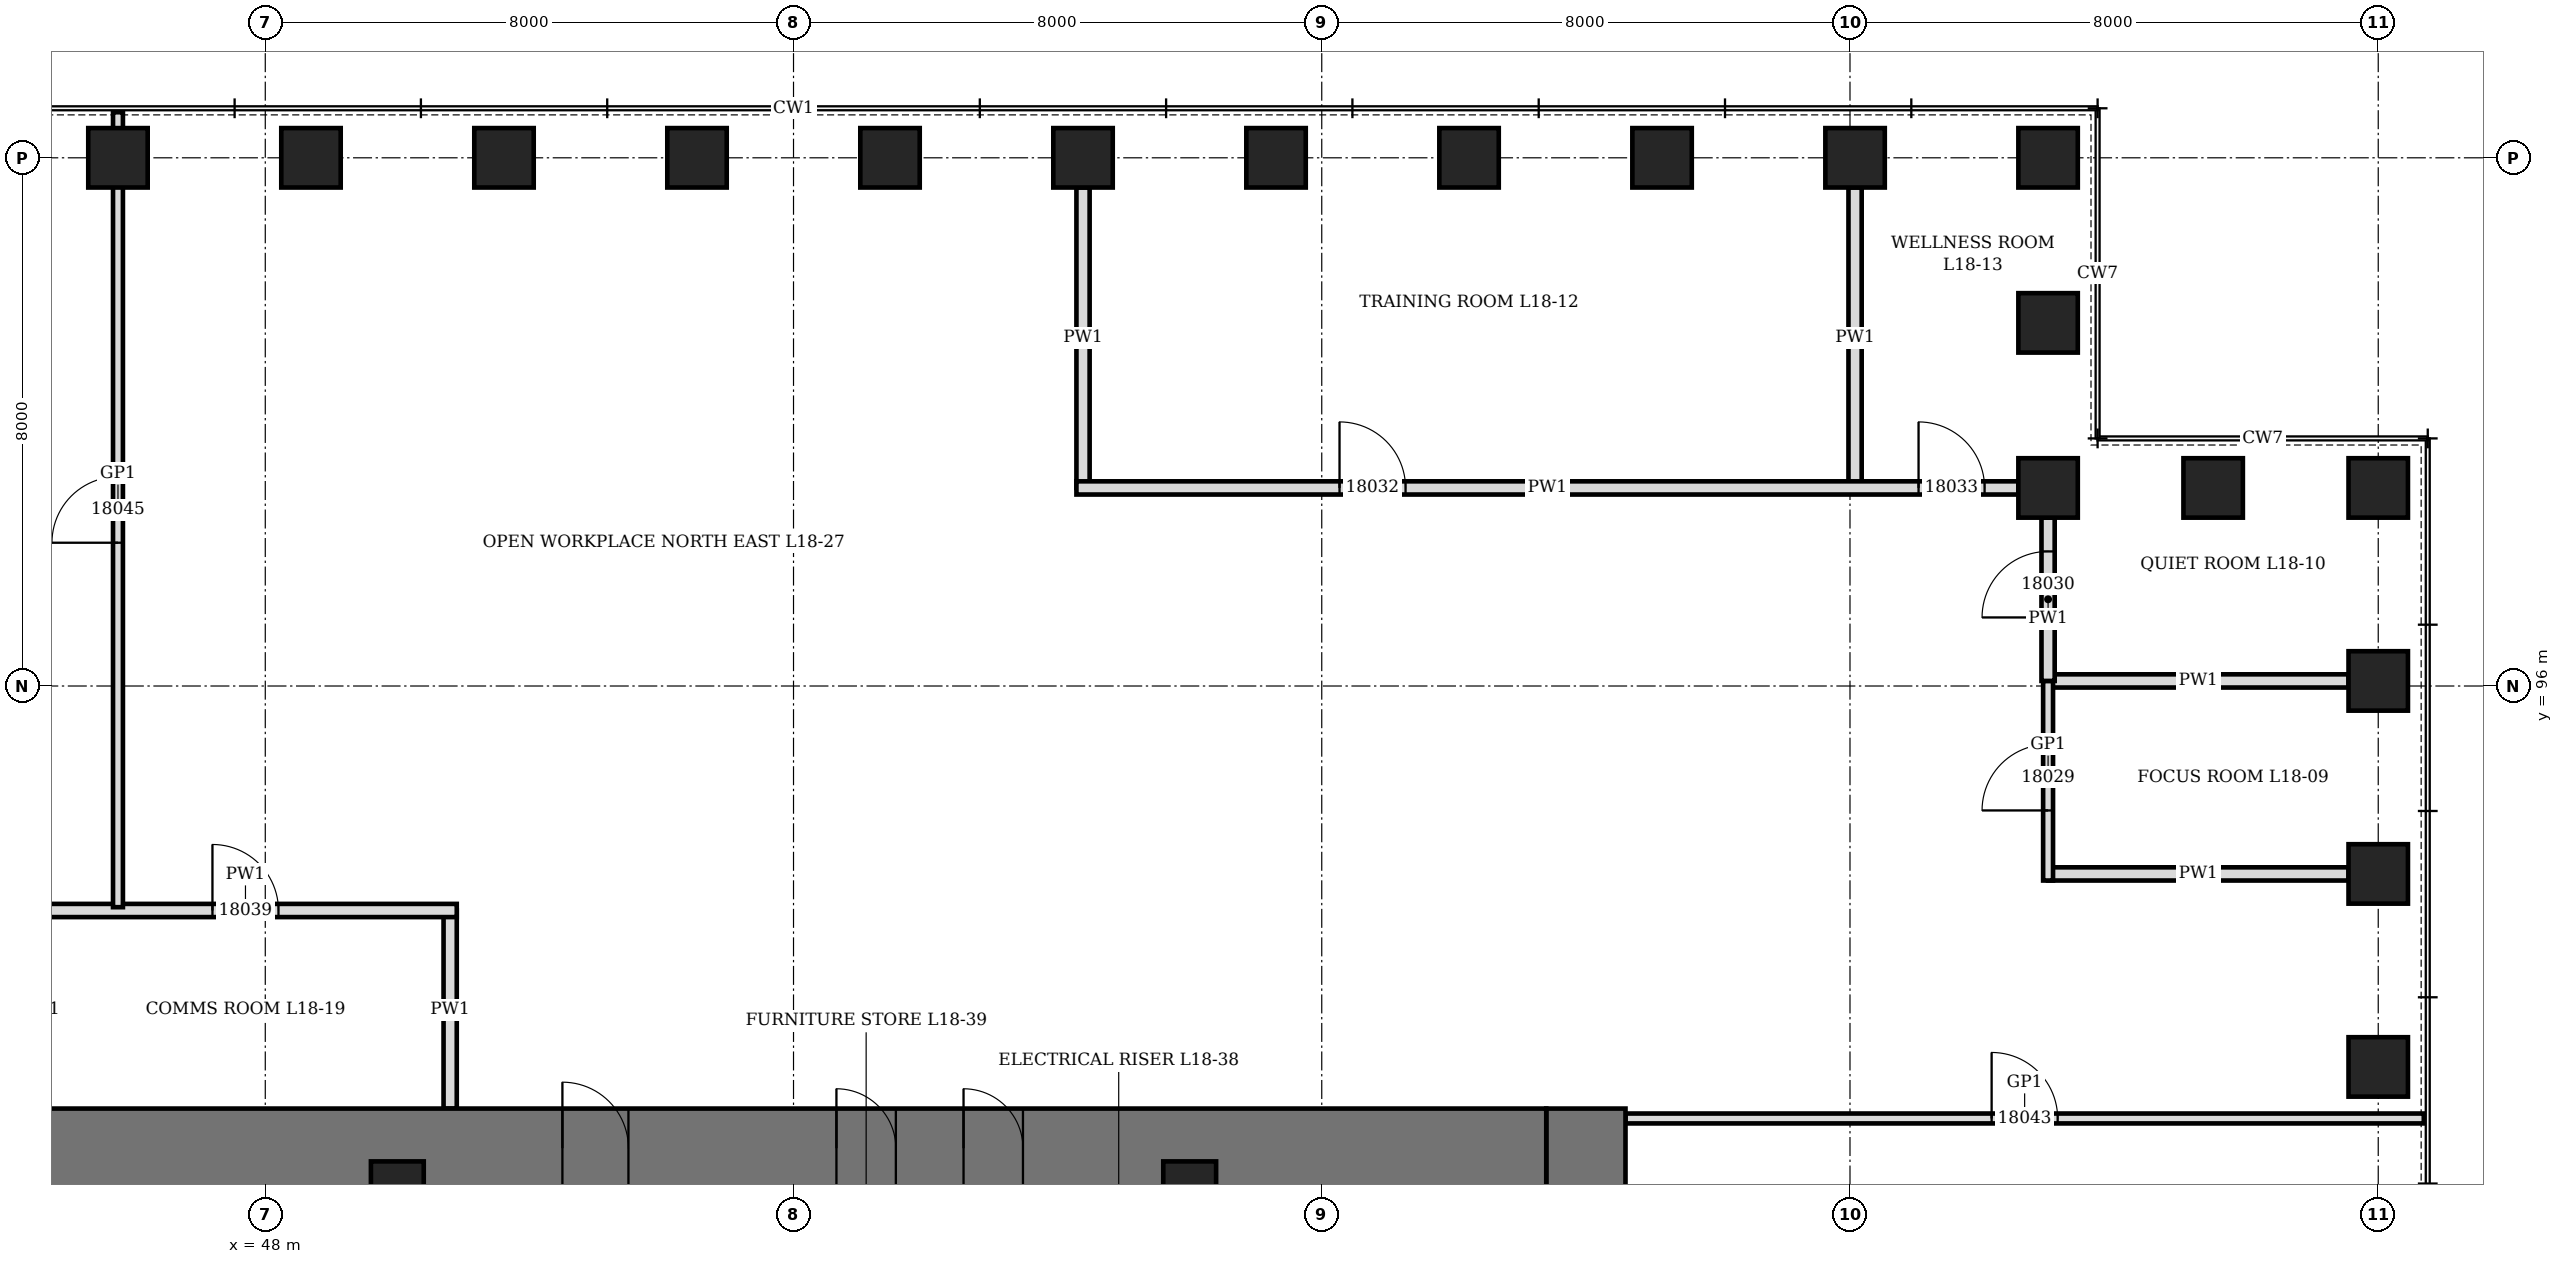
"""IFC4 building model, lengths in metres.
Left out: names, types, materials, properties, quantities, classifications, styles, units other than length and angle.
Written with IfcOpenShell. Run it as: python <this file> out.ifc"""

import sys

from ifc_helpers import new_model, si_unit, direction, frame, frame_2d, origin, origin_2d, place, context, subcontext, project, spatial, rectangle, hollow_rectangle, extrude, element, fill, save


model = new_model("IFC4")
c1 = context("Model", 3, precision=1e-05, world=origin(), true_north=direction((0.0, 1.0)))
c2 = subcontext(c1, "Body", "Model", "MODEL_VIEW")
j1 = project(units=[si_unit("LENGTHUNIT", "METRE"), si_unit("PLANEANGLEUNIT", "RADIAN")], contexts=[c1])
p1 = place(None, origin())
s1 = spatial("IfcSite", under=j1, at=p1, CompositionType="ELEMENT")
p2 = place(p1, origin())
s2 = spatial("IfcBuilding", under=s1, at=p2, CompositionType="ELEMENT")
p3 = place(p2, frame((0.0, 0.0, 85.3)))
s3 = spatial("IfcBuildingStorey", under=s2, at=p3, CompositionType="ELEMENT", Elevation=85.3)
for number, where, z_axis, x_axis in (
    (1, (80.0, 90.231, 0.0), (0.0, 0.0, 1.0), (0.0, 1.0, 0.0)),
    (2, (80.0, 93.154, 0.0), (0.0, 0.0, 1.0), (0.0, 1.0, 0.0)),
    (3, (80.0, 96.077, 0.0), (0.0, 0.0, 1.0), (0.0, 1.0, 0.0)),
    (4, (80.0, 99.0, 0.0), (0.0, 0.0, 1.0), (1.0, 0.0, 0.0)),
    (5, (77.5, 99.0, 0.0), (0.0, 0.0, 1.0), (1.0, 0.0, 0.0)),
    (6, (75.0, 99.0, 0.0), (0.0, 0.0, 1.0), (0.0, 1.0, 0.0)),
    (7, (75.0, 101.5, 0.0), (0.0, 0.0, 1.0), (0.0, 1.0, 0.0)),
    (8, (75.0, 104.0, 0.0), (0.0, 0.0, 1.0), (1.0, 0.0, 0.0)),
    (9, (72.077, 104.0, 0.0), (0.0, 0.0, 1.0), (1.0, 0.0, 0.0)),
    (10, (69.154, 104.0, 0.0), (0.0, 0.0, 1.0), (1.0, 0.0, 0.0)),
    (11, (66.231, 104.0, 0.0), (0.0, 0.0, 1.0), (1.0, 0.0, 0.0)),
    (12, (63.308, 104.0, 0.0), (0.0, 0.0, 1.0), (1.0, 0.0, 0.0)),
    (13, (60.385, 104.0, 0.0), (0.0, 0.0, 1.0), (1.0, 0.0, 0.0)),
    (14, (57.461, 104.0, 0.0), (0.0, 0.0, 1.0), (1.0, 0.0, 0.0)),
    (15, (54.539, 104.0, 0.0), (0.0, 0.0, 1.0), (1.0, 0.0, 0.0)),
    (16, (51.615, 104.0, 0.0), (0.0, 0.0, 1.0), (1.0, 0.0, 0.0)),
    (17, (48.692, 104.0, 0.0), (0.0, 0.0, 1.0), (1.0, 0.0, 0.0)),
    (18, (45.769, 104.0, 0.0), (0.0, 0.0, 1.0), (1.0, 0.0, 0.0)),
):
    element("IfcColumn", number, at=place(p3, frame(where, z_axis=z_axis, x_axis=x_axis)), inside=s3, PredefinedType="COLUMN", context=c2, shape_type="SweptSolid", body=[
        extrude(hollow_rectangle(XDim=0.9, YDim=0.9, WallThickness=0.12, at=origin_2d()), origin(), (0.0, 0.0, 1.0), 4.2),
    ])
p4 = place(p3, frame((68.0, 70.4, 0.0), z_axis=(0.0, 0.0, 1.0), x_axis=(0.0, 1.0, 0.0)))
e19 = element("IfcWall", 19, at=p4, inside=s3, PredefinedType="SHEAR", context=c2, shape_type="SweptSolid", body=[
    extrude(rectangle(XDim=19.2, YDim=1.2, at=frame_2d((9.6, 0.0))), origin(), (0.0, 0.0, 1.0), 4.2),
])
p5 = place(p4, frame((8.6, 0.0, 0.0)))
e20 = element("IfcOpeningElement", 20, at=p5, cuts=e19, PredefinedType="OPENING", context=c2, shape_type="SweptSolid", body=[
    extrude(rectangle(XDim=2.0, YDim=2.4, at=frame_2d((1.0, 1.2))), frame((0.0, 0.61, 0.0), z_axis=(0.0, -1.0, 0.0), x_axis=(1.0, 0.0, 0.0)), (0.0, 0.0, 1.0), 1.22),
])
p6 = place(p3, frame((44.6, 89.0, 0.0), z_axis=(0.0, 0.0, 1.0), x_axis=(1.0, 0.0, 0.0)))
e21 = element("IfcWall", 21, at=p6, inside=s3, PredefinedType="SHEAR", context=c2, shape_type="SweptSolid", body=[
    extrude(rectangle(XDim=22.8, YDim=1.2, at=frame_2d((11.4, 0.0))), origin(), (0.0, 0.0, 1.0), 4.2),
])
p7 = place(p6, frame((7.9, 0.0, 0.0)))
e22 = element("IfcOpeningElement", 22, at=p7, cuts=e21, PredefinedType="OPENING", context=c2, shape_type="SweptSolid", body=[
    extrude(rectangle(XDim=1.0, YDim=2.1, at=frame_2d((0.5, 1.05))), frame((0.0, 0.61, 0.0), z_axis=(0.0, -1.0, 0.0), x_axis=(1.0, 0.0, 0.0)), (0.0, 0.0, 1.0), 1.22),
])
p8 = place(p6, frame((12.05, 0.0, 0.0)))
e23 = element("IfcOpeningElement", 23, at=p8, cuts=e21, PredefinedType="OPENING", context=c2, shape_type="SweptSolid", body=[
    extrude(rectangle(XDim=0.9, YDim=2.1, at=frame_2d((0.45, 1.05))), frame((0.0, 0.61, 0.0), z_axis=(0.0, -1.0, 0.0), x_axis=(1.0, 0.0, 0.0)), (0.0, 0.0, 1.0), 1.22),
])
p9 = place(p6, frame((13.975, 0.0, 0.0)))
e24 = element("IfcOpeningElement", 24, at=p9, cuts=e21, PredefinedType="OPENING", context=c2, shape_type="SweptSolid", body=[
    extrude(rectangle(XDim=0.9, YDim=2.1, at=frame_2d((0.45, 1.05))), frame((0.0, 0.61, 0.0), z_axis=(0.0, -1.0, 0.0), x_axis=(1.0, 0.0, 0.0)), (0.0, 0.0, 1.0), 1.22),
])
for number, where, z_axis, x_axis in (
    (25, (50.0, 88.4, 0.0), (0.0, 0.0, 1.0), (1.0, 0.0, 0.0)),
    (26, (62.0, 88.4, 0.0), (0.0, 0.0, 1.0), (1.0, 0.0, 0.0)),
):
    element("IfcColumn", number, at=place(p3, frame(where, z_axis=z_axis, x_axis=x_axis)), inside=s3, PredefinedType="COLUMN", context=c2, shape_type="SweptSolid", body=[
        extrude(hollow_rectangle(XDim=0.8, YDim=0.8, WallThickness=0.1, at=origin_2d()), origin(), (0.0, 0.0, 1.0), 4.2),
    ])
for number, where, z_axis, x_axis in (
    (27, (75.0, 93.154, 0.0), (0.0, 0.0, 1.0), (1.0, 0.0, 0.0)),
    (28, (75.0, 96.077, 0.0), (0.0, 0.0, 1.0), (1.0, 0.0, 0.0)),
):
    element("IfcWall", number, at=place(p3, frame(where, z_axis=z_axis, x_axis=x_axis)), inside=s3, PredefinedType="PARTITIONING", context=c2, shape_type="SweptSolid", body=[
        extrude(rectangle(XDim=4.55, YDim=0.2, at=frame_2d((2.275, 0.0))), origin(), (0.0, 0.0, 1.0), 3.428),
    ])
p10 = place(p3, frame((60.385, 99.0, 0.0), z_axis=(0.0, 0.0, 1.0), x_axis=(0.0, 1.0, 0.0)))
e29 = element("IfcWall", 29, at=p10, inside=s3, PredefinedType="PARTITIONING", context=c2, shape_type="SweptSolid", body=[
    extrude(rectangle(XDim=4.55, YDim=0.2, at=frame_2d((2.275, 0.0))), origin(), (0.0, 0.0, 1.0), 3.278),
])
p11 = place(p3, frame((72.077, 99.0, 0.0), z_axis=(0.0, 0.0, 1.0), x_axis=(0.0, 1.0, 0.0)))
e30 = element("IfcWall", 30, at=p11, inside=s3, PredefinedType="PARTITIONING", context=c2, shape_type="SweptSolid", body=[
    extrude(rectangle(XDim=4.55, YDim=0.2, at=frame_2d((2.275, 0.0))), origin(), (0.0, 0.0, 1.0), 3.428),
])
p12 = place(p3, frame((50.8, 89.6, 0.0), z_axis=(0.0, 0.0, 1.0), x_axis=(0.0, 1.0, 0.0)))
e31 = element("IfcWall", 31, at=p12, inside=s3, PredefinedType="PARTITIONING", context=c2, shape_type="SweptSolid", body=[
    extrude(rectangle(XDim=3.0, YDim=0.2, at=frame_2d((1.5, 0.0))), origin(), (0.0, 0.0, 1.0), 4.04),
])
p13 = place(p3, frame((68.6, 89.45, 0.0), z_axis=(0.0, 0.0, 1.0), x_axis=(1.0, 0.0, 0.0)))
e32 = element("IfcWall", 32, at=p13, inside=s3, PredefinedType="PARTITIONING", context=c2, shape_type="SweptSolid", body=[
    extrude(rectangle(XDim=12.09, YDim=0.15, at=frame_2d((6.045, 0.0))), origin(), (0.0, 0.0, 1.0), 4.04),
])
p14 = place(p13, frame((5.545, 0.0, 0.0)))
e33 = element("IfcOpeningElement", 33, at=p14, cuts=e32, PredefinedType="OPENING", context=c2, shape_type="SweptSolid", body=[
    extrude(rectangle(XDim=1.0, YDim=2.4, at=frame_2d((0.5, 1.2))), frame((0.0, 0.085, 0.0), z_axis=(0.0, -1.0, 0.0), x_axis=(1.0, 0.0, 0.0)), (0.0, 0.0, 1.0), 0.17),
])
p15 = place(p3, frame((44.5, 92.6, 0.0), z_axis=(0.0, 0.0, 1.0), x_axis=(1.0, 0.0, 0.0)))
e34 = element("IfcWall", 34, at=p15, inside=s3, PredefinedType="PARTITIONING", context=c2, shape_type="SweptSolid", body=[
    extrude(rectangle(XDim=6.4, YDim=0.2, at=frame_2d((3.2, 0.0))), origin(), (0.0, 0.0, 1.0), 4.04),
])
p16 = place(p15, frame((2.7, 0.0, 0.0)))
e35 = element("IfcOpeningElement", 35, at=p16, cuts=e34, PredefinedType="OPENING", context=c2, shape_type="SweptSolid", body=[
    extrude(rectangle(XDim=1.0, YDim=2.1, at=frame_2d((0.5, 1.05))), frame((0.0, 0.11, 0.0), z_axis=(0.0, -1.0, 0.0), x_axis=(1.0, 0.0, 0.0)), (0.0, 0.0, 1.0), 0.22),
])
p17 = place(p3, frame((60.285, 99.0, 0.0), z_axis=(0.0, 0.0, 1.0), x_axis=(1.0, 0.0, 0.0)))
e36 = element("IfcWall", 36, at=p17, inside=s3, PredefinedType="PARTITIONING", context=c2, shape_type="SweptSolid", body=[
    extrude(rectangle(XDim=14.265, YDim=0.2, at=frame_2d((7.133, 0.0))), origin(), (0.0, 0.0, 1.0), 4.04),
])
p18 = place(p17, frame((3.985, 0.0, 0.0)))
e37 = element("IfcOpeningElement", 37, at=p18, cuts=e36, PredefinedType="OPENING", context=c2, shape_type="SweptSolid", body=[
    extrude(rectangle(XDim=1.0, YDim=2.1, at=frame_2d((0.5, 1.05))), frame((0.0, 0.11, 0.0), z_axis=(0.0, -1.0, 0.0), x_axis=(1.0, 0.0, 0.0)), (0.0, 0.0, 1.0), 0.22),
])
p19 = place(p17, frame((12.754, 0.0, 0.0)))
e38 = element("IfcOpeningElement", 38, at=p19, cuts=e36, PredefinedType="OPENING", context=c2, shape_type="SweptSolid", body=[
    extrude(rectangle(XDim=1.0, YDim=2.1, at=frame_2d((0.5, 1.05))), frame((0.0, 0.11, 0.0), z_axis=(0.0, -1.0, 0.0), x_axis=(1.0, 0.0, 0.0)), (0.0, 0.0, 1.0), 0.22),
])
p20 = place(p3, frame((45.769, 92.65, 0.0), z_axis=(0.0, 0.0, 1.0), x_axis=(0.0, 1.0, 0.0)))
e39 = element("IfcWall", 39, at=p20, inside=s3, PredefinedType="PARTITIONING", context=c2, shape_type="SweptSolid", body=[
    extrude(rectangle(XDim=12.04, YDim=0.15, at=frame_2d((6.02, 0.0))), origin(), (0.0, 0.0, 1.0), 3.278),
])
p21 = place(p20, frame((5.52, 0.0, 0.0)))
e40 = element("IfcOpeningElement", 40, at=p21, cuts=e39, PredefinedType="OPENING", context=c2, shape_type="SweptSolid", body=[
    extrude(rectangle(XDim=1.0, YDim=2.4, at=frame_2d((0.5, 1.2))), frame((0.0, 0.085, 0.0), z_axis=(0.0, -1.0, 0.0), x_axis=(1.0, 0.0, 0.0)), (0.0, 0.0, 1.0), 0.17),
])
p22 = place(p3, frame((75.0, 93.054, 0.0), z_axis=(0.0, 0.0, 1.0), x_axis=(0.0, 1.0, 0.0)))
e41 = element("IfcWall", 41, at=p22, inside=s3, PredefinedType="PARTITIONING", context=c2, shape_type="SweptSolid", body=[
    extrude(rectangle(XDim=3.023, YDim=0.15, at=frame_2d((1.511, 0.0))), origin(), (0.0, 0.0, 1.0), 4.04),
])
p23 = place(p22, frame((1.062, 0.0, 0.0)))
e42 = element("IfcOpeningElement", 42, at=p23, cuts=e41, PredefinedType="OPENING", context=c2, shape_type="SweptSolid", body=[
    extrude(rectangle(XDim=1.0, YDim=2.4, at=frame_2d((0.5, 1.2))), frame((0.0, 0.085, 0.0), z_axis=(0.0, -1.0, 0.0), x_axis=(1.0, 0.0, 0.0)), (0.0, 0.0, 1.0), 0.17),
])
p24 = place(p3, frame((75.0, 96.077, 0.0), z_axis=(0.0, 0.0, 1.0), x_axis=(0.0, 1.0, 0.0)))
e43 = element("IfcWall", 43, at=p24, inside=s3, PredefinedType="PARTITIONING", context=c2, shape_type="SweptSolid", body=[
    extrude(rectangle(XDim=2.473, YDim=0.2, at=frame_2d((1.237, 0.0))), origin(), (0.0, 0.0, 1.0), 4.04),
])
p25 = place(p24, frame((0.961, 0.0, 0.0)))
e44 = element("IfcOpeningElement", 44, at=p25, cuts=e43, PredefinedType="OPENING", context=c2, shape_type="SweptSolid", body=[
    extrude(rectangle(XDim=1.0, YDim=2.1, at=frame_2d((0.5, 1.05))), frame((0.0, 0.11, 0.0), z_axis=(0.0, -1.0, 0.0), x_axis=(1.0, 0.0, 0.0)), (0.0, 0.0, 1.0), 0.22),
])
p26 = place(p7, origin())
e45 = element("IfcDoor", 45, at=p26, inside=s3, OperationType="SINGLE_SWING_LEFT", PredefinedType="DOOR", context=c2, shape_type="SweptSolid", body=[
    extrude(rectangle(XDim=1.0, YDim=2.1, at=frame_2d((0.5, 1.05))), frame((0.0, 0.35, 0.0), z_axis=(0.0, -1.0, 0.0), x_axis=(1.0, 0.0, 0.0)), (0.0, 0.0, 1.0), 0.7),
])
fill(e22, e45)
p27 = place(p8, origin())
e46 = element("IfcDoor", 46, at=p27, inside=s3, OperationType="SINGLE_SWING_LEFT", PredefinedType="DOOR", context=c2, shape_type="SweptSolid", body=[
    extrude(rectangle(XDim=0.9, YDim=2.1, at=frame_2d((0.45, 1.05))), frame((0.0, 0.35, 0.0), z_axis=(0.0, -1.0, 0.0), x_axis=(1.0, 0.0, 0.0)), (0.0, 0.0, 1.0), 0.7),
])
fill(e23, e46)
p28 = place(p9, origin())
e47 = element("IfcDoor", 47, at=p28, inside=s3, OperationType="SINGLE_SWING_LEFT", PredefinedType="DOOR", context=c2, shape_type="SweptSolid", body=[
    extrude(rectangle(XDim=0.9, YDim=2.1, at=frame_2d((0.45, 1.05))), frame((0.0, 0.35, 0.0), z_axis=(0.0, -1.0, 0.0), x_axis=(1.0, 0.0, 0.0)), (0.0, 0.0, 1.0), 0.7),
])
fill(e24, e47)
p29 = place(p23, origin())
e48 = element("IfcDoor", 48, at=p29, inside=s3, OperationType="SINGLE_SWING_RIGHT", PredefinedType="DOOR", context=c2, shape_type="SweptSolid", body=[
    extrude(rectangle(XDim=1.0, YDim=2.4, at=frame_2d((0.5, 1.2))), frame((0.0, 0.075, 0.0), z_axis=(0.0, -1.0, 0.0), x_axis=(1.0, 0.0, 0.0)), (0.0, 0.0, 1.0), 0.149),
])
fill(e42, e48)
p30 = place(p25, origin())
e49 = element("IfcDoor", 49, at=p30, inside=s3, OperationType="SINGLE_SWING_LEFT", PredefinedType="DOOR", context=c2, shape_type="SweptSolid", body=[
    extrude(rectangle(XDim=1.0, YDim=2.1, at=frame_2d((0.5, 1.05))), frame((0.0, 0.1, 0.0), z_axis=(0.0, -1.0, 0.0), x_axis=(1.0, 0.0, 0.0)), (0.0, 0.0, 1.0), 0.199),
])
fill(e44, e49)
p31 = place(p18, origin())
e50 = element("IfcDoor", 50, at=p31, inside=s3, OperationType="SINGLE_SWING_LEFT", PredefinedType="DOOR", context=c2, shape_type="SweptSolid", body=[
    extrude(rectangle(XDim=1.0, YDim=2.1, at=frame_2d((0.5, 1.05))), frame((0.0, 0.1, 0.0), z_axis=(0.0, -1.0, 0.0), x_axis=(1.0, 0.0, 0.0)), (0.0, 0.0, 1.0), 0.199),
])
fill(e37, e50)
p32 = place(p19, origin())
e51 = element("IfcDoor", 51, at=p32, inside=s3, OperationType="SINGLE_SWING_LEFT", PredefinedType="DOOR", context=c2, shape_type="SweptSolid", body=[
    extrude(rectangle(XDim=1.0, YDim=2.1, at=frame_2d((0.5, 1.05))), frame((0.0, 0.1, 0.0), z_axis=(0.0, -1.0, 0.0), x_axis=(1.0, 0.0, 0.0)), (0.0, 0.0, 1.0), 0.199),
])
fill(e38, e51)
p33 = place(p16, origin())
e52 = element("IfcDoor", 52, at=p33, inside=s3, OperationType="SINGLE_SWING_LEFT", PredefinedType="DOOR", context=c2, shape_type="SweptSolid", body=[
    extrude(rectangle(XDim=1.0, YDim=2.1, at=frame_2d((0.5, 1.05))), frame((0.0, 0.1, 0.0), z_axis=(0.0, -1.0, 0.0), x_axis=(1.0, 0.0, 0.0)), (0.0, 0.0, 1.0), 0.199),
])
fill(e35, e52)
p34 = place(p14, origin())
e53 = element("IfcDoor", 53, at=p34, inside=s3, OperationType="SINGLE_SWING_RIGHT", PredefinedType="DOOR", context=c2, shape_type="SweptSolid", body=[
    extrude(rectangle(XDim=1.0, YDim=2.4, at=frame_2d((0.5, 1.2))), frame((0.0, 0.075, 0.0), z_axis=(0.0, -1.0, 0.0), x_axis=(1.0, 0.0, 0.0)), (0.0, 0.0, 1.0), 0.149),
])
fill(e33, e53)
p35 = place(p21, origin())
e54 = element("IfcDoor", 54, at=p35, inside=s3, OperationType="SINGLE_SWING_RIGHT", PredefinedType="DOOR", context=c2, shape_type="SweptSolid", body=[
    extrude(rectangle(XDim=1.0, YDim=2.4, at=frame_2d((0.5, 1.2))), frame((0.0, 0.075, 0.0), z_axis=(0.0, -1.0, 0.0), x_axis=(1.0, 0.0, 0.0)), (0.0, 0.0, 1.0), 0.149),
])
fill(e40, e54)
save(model, sys.argv[1])
